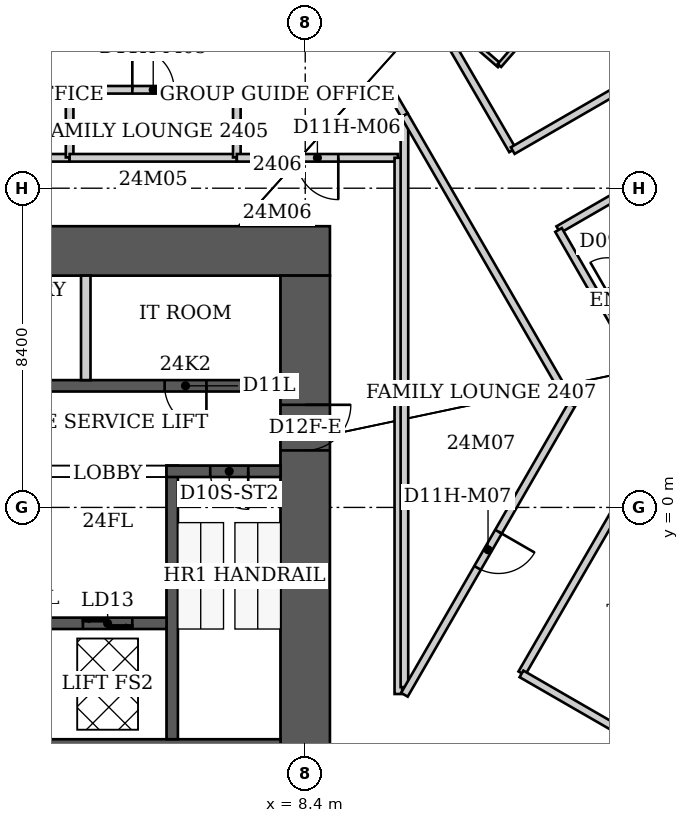
"""IFC4 building model, lengths in metres.
Left out: names, types, materials, properties, quantities, classifications, styles, units other than length and angle.
Written with IfcOpenShell. Run it as: python <this file> out.ifc"""

import sys

from ifc_helpers import new_model, si_unit, direction, frame, frame_2d, origin, place, context, subcontext, project, spatial, rectangle, extrude, element, fill, save


model = new_model("IFC4")
c1 = context("Model", 3, precision=1e-05, world=origin(), true_north=direction((0.0, 1.0)))
c2 = subcontext(c1, "Body", "Model", "MODEL_VIEW")
j1 = project(units=[si_unit("LENGTHUNIT", "METRE"), si_unit("PLANEANGLEUNIT", "RADIAN")], contexts=[c1])
p1 = place(None, origin())
s1 = spatial("IfcSite", under=j1, at=p1, CompositionType="ELEMENT")
p2 = place(p1, origin())
s2 = spatial("IfcBuilding", under=s1, at=p2, CompositionType="ELEMENT")
p3 = place(p2, frame((0.0, 0.0, 100.6)))
s3 = spatial("IfcBuildingStorey", under=s2, at=p3, CompositionType="ELEMENT", Elevation=100.6)
p4 = place(p3, frame((-9.05, 6.75, 0.0), z_axis=(0.0, 0.0, 1.0), x_axis=(1.0, 0.0, 0.0)))
e1 = element("IfcWall", 1, at=p4, inside=s3, PredefinedType="SHEAR", context=c2, shape_type="SweptSolid", body=[
    extrude(rectangle(XDim=18.1, YDim=1.3, at=frame_2d((9.05, 0.0))), origin(), (0.0, 0.0, 1.0), 3.8),
])
p5 = place(p3, frame((8.4, -9.2, 0.0), z_axis=(0.0, 0.0, 1.0), x_axis=(0.0, 1.0, 0.0)))
e2 = element("IfcWall", 2, at=p5, inside=s3, PredefinedType="SHEAR", context=c2, shape_type="SweptSolid", body=[
    extrude(rectangle(XDim=15.3, YDim=1.3, at=frame_2d((7.65, 0.0))), origin(), (0.0, 0.0, 1.0), 3.8),
])
p6 = place(p5, frame((10.7, 0.0, 0.0)))
e3 = element("IfcOpeningElement", 3, at=p6, cuts=e2, PredefinedType="OPENING", context=c2, shape_type="SweptSolid", body=[
    extrude(rectangle(XDim=1.2, YDim=2.2, at=frame_2d((0.6, 1.1))), frame((0.0, 0.65, 0.0), z_axis=(0.0, -1.0, 0.0), x_axis=(1.0, 0.0, 0.0)), (0.0, 0.0, 1.0), 1.3),
])
p7 = place(p3, frame((-7.75, -6.5, 0.0), z_axis=(0.0, 0.0, 1.0), x_axis=(1.0, 0.0, 0.0)))
e4 = element("IfcWall", 4, at=p7, inside=s3, PredefinedType="SHEAR", context=c2, shape_type="SweptSolid", body=[
    extrude(rectangle(XDim=15.5, YDim=0.8, at=frame_2d((7.75, 0.0))), origin(), (0.0, 0.0, 1.0), 3.8),
])
p8 = place(p3, frame((4.9, -6.1, 0.0), z_axis=(0.0, 0.0, 1.0), x_axis=(0.0, 1.0, 0.0)))
e5 = element("IfcWall", 5, at=p8, inside=s3, PredefinedType="SHEAR", context=c2, shape_type="SweptSolid", body=[
    extrude(rectangle(XDim=7.2, YDim=0.3, at=frame_2d((3.6, 0.0))), origin(), (0.0, 0.0, 1.0), 3.8),
])
p9 = place(p3, frame((4.75, 0.95, 0.0), z_axis=(0.0, 0.0, 1.0), x_axis=(1.0, 0.0, 0.0)))
e6 = element("IfcWall", 6, at=p9, inside=s3, PredefinedType="SHEAR", context=c2, shape_type="SweptSolid", body=[
    extrude(rectangle(XDim=3.0, YDim=0.3, at=frame_2d((1.5, 0.0))), origin(), (0.0, 0.0, 1.0), 3.8),
])
p10 = place(p9, frame((1.15, 0.0, 0.0)))
e7 = element("IfcOpeningElement", 7, at=p10, cuts=e6, PredefinedType="OPENING", context=c2, shape_type="SweptSolid", body=[
    extrude(rectangle(XDim=1.0, YDim=2.2, at=frame_2d((0.5, 1.1))), frame((0.0, 0.15, 0.0), z_axis=(0.0, -1.0, 0.0), x_axis=(1.0, 0.0, 0.0)), (0.0, 0.0, 1.0), 0.3),
])
p11 = place(p3, frame((1.65, -3.05, 0.0), z_axis=(0.0, 0.0, 1.0), x_axis=(1.0, 0.0, 0.0)))
e8 = element("IfcWall", 8, at=p11, inside=s3, PredefinedType="SHEAR", context=c2, shape_type="SweptSolid", body=[
    extrude(rectangle(XDim=3.1, YDim=0.3, at=frame_2d((1.55, 0.0))), origin(), (0.0, 0.0, 1.0), 3.8),
])
p12 = place(p11, frame((0.9, 0.0, 0.0)))
e9 = element("IfcOpeningElement", 9, at=p12, cuts=e8, PredefinedType="OPENING", context=c2, shape_type="SweptSolid", body=[
    extrude(rectangle(XDim=1.3, YDim=2.1, at=frame_2d((0.65, 1.05))), frame((0.0, 0.15, 0.0), z_axis=(0.0, -1.0, 0.0), x_axis=(1.0, 0.0, 0.0)), (0.0, 0.0, 1.0), 0.3),
])
p13 = place(p3, frame((-7.75, 3.2, 0.0), z_axis=(0.0, 0.0, 1.0), x_axis=(1.0, 0.0, 0.0)))
e10 = element("IfcWall", 10, at=p13, inside=s3, PredefinedType="SHEAR", context=c2, shape_type="SweptSolid", body=[
    extrude(rectangle(XDim=15.5, YDim=0.3, at=frame_2d((7.75, 0.0))), origin(), (0.0, 0.0, 1.0), 3.8),
])
p14 = place(p13, frame((7.2, 0.0, 0.0)))
e11 = element("IfcOpeningElement", 11, at=p14, cuts=e10, PredefinedType="OPENING", context=c2, shape_type="SweptSolid", body=[
    extrude(rectangle(XDim=1.1, YDim=2.2, at=frame_2d((0.55, 1.1))), frame((0.0, 0.15, 0.0), z_axis=(0.0, -1.0, 0.0), x_axis=(1.0, 0.0, 0.0)), (0.0, 0.0, 1.0), 0.3),
])
p15 = place(p13, frame((12.45, 0.0, 0.0)))
e12 = element("IfcOpeningElement", 12, at=p15, cuts=e10, PredefinedType="OPENING", context=c2, shape_type="SweptSolid", body=[
    extrude(rectangle(XDim=1.1, YDim=2.2, at=frame_2d((0.55, 1.1))), frame((0.0, 0.15, 0.0), z_axis=(0.0, -1.0, 0.0), x_axis=(1.0, 0.0, 0.0)), (0.0, 0.0, 1.0), 0.3),
])
p16 = place(p3, frame((2.625, 3.35, 0.0), z_axis=(0.0, 0.0, 1.0), x_axis=(0.0, 1.0, 0.0)))
e13 = element("IfcWall", 13, at=p16, inside=s3, PredefinedType="PARTITIONING", context=c2, shape_type="SweptSolid", body=[
    extrude(rectangle(XDim=2.75, YDim=0.25, at=frame_2d((1.375, 0.0))), origin(), (0.0, 0.0, 1.0), 3.8),
])
p17 = place(p3, frame((-2.2, 10.99, 0.0), z_axis=(0.0, 0.0, 1.0), x_axis=(1.0, 0.0, 0.0)))
e14 = element("IfcWall", 14, at=p17, inside=s3, PredefinedType="PARTITIONING", context=c2, shape_type="SweptSolid", body=[
    extrude(rectangle(XDim=4.4, YDim=0.2, at=frame_2d((2.2, 0.0))), origin(), (0.0, 0.0, 1.0), 3.64),
])
p18 = place(p17, frame((1.65, 0.0, 0.0)))
e15 = element("IfcOpeningElement", 15, at=p18, cuts=e14, PredefinedType="OPENING", context=c2, shape_type="SweptSolid", body=[
    extrude(rectangle(XDim=1.1, YDim=2.2, at=frame_2d((0.55, 1.1))), frame((0.0, 0.1, 0.0), z_axis=(0.0, -1.0, 0.0), x_axis=(1.0, 0.0, 0.0)), (0.0, 0.0, 1.0), 0.2),
])
p19 = place(p3, frame((2.2, 9.2, 0.0), z_axis=(0.0, 0.0, 1.0), x_axis=(-1.0, 0.0, 0.0)))
e16 = element("IfcWall", 16, at=p19, inside=s3, PredefinedType="PARTITIONING", context=c2, shape_type="SweptSolid", body=[
    extrude(rectangle(XDim=4.4, YDim=0.2, at=frame_2d((2.2, 0.0))), origin(), (0.0, 0.0, 1.0), 3.64),
])
p20 = place(p3, frame((2.2, 10.98, 0.0), z_axis=(0.0, 0.0, 1.0), x_axis=(0.0, -1.0, 0.0)))
e17 = element("IfcWall", 17, at=p20, inside=s3, PredefinedType="PARTITIONING", context=c2, shape_type="SweptSolid", body=[
    extrude(rectangle(XDim=1.77, YDim=0.2, at=frame_2d((0.885, 0.0))), origin(), (0.0, 0.0, 1.0), 3.64),
])
p21 = place(p3, frame((2.2, 10.99, 0.0), z_axis=(0.0, 0.0, 1.0), x_axis=(1.0, 0.0, 0.0)))
e18 = element("IfcWall", 18, at=p21, inside=s3, PredefinedType="PARTITIONING", context=c2, shape_type="SweptSolid", body=[
    extrude(rectangle(XDim=4.4, YDim=0.2, at=frame_2d((2.2, 0.0))), origin(), (0.0, 0.0, 1.0), 3.64),
])
p22 = place(p21, frame((1.65, 0.0, 0.0)))
e19 = element("IfcOpeningElement", 19, at=p22, cuts=e18, PredefinedType="OPENING", context=c2, shape_type="SweptSolid", body=[
    extrude(rectangle(XDim=1.1, YDim=2.2, at=frame_2d((0.55, 1.1))), frame((0.0, 0.1, 0.0), z_axis=(0.0, -1.0, 0.0), x_axis=(1.0, 0.0, 0.0)), (0.0, 0.0, 1.0), 0.2),
])
p23 = place(p3, frame((6.6, 9.2, 0.0), z_axis=(0.0, 0.0, 1.0), x_axis=(-1.0, 0.0, 0.0)))
e20 = element("IfcWall", 20, at=p23, inside=s3, PredefinedType="PARTITIONING", context=c2, shape_type="SweptSolid", body=[
    extrude(rectangle(XDim=4.4, YDim=0.2, at=frame_2d((2.2, 0.0))), origin(), (0.0, 0.0, 1.0), 3.64),
])
p24 = place(p3, frame((6.6, 10.98, 0.0), z_axis=(0.0, 0.0, 1.0), x_axis=(0.0, -1.0, 0.0)))
e21 = element("IfcWall", 21, at=p24, inside=s3, PredefinedType="PARTITIONING", context=c2, shape_type="SweptSolid", body=[
    extrude(rectangle(XDim=1.77, YDim=0.2, at=frame_2d((0.885, 0.0))), origin(), (0.0, 0.0, 1.0), 3.64),
])
p25 = place(p3, frame((6.6, 10.99, 0.0), z_axis=(0.0, 0.0, 1.0), x_axis=(1.0, 0.0, 0.0)))
e22 = element("IfcWall", 22, at=p25, inside=s3, PredefinedType="PARTITIONING", context=c2, shape_type="SweptSolid", body=[
    extrude(rectangle(XDim=4.02, YDim=0.2, at=frame_2d((2.01, 0.0))), origin(), (0.0, 0.0, 1.0), 3.64),
])
p26 = place(p3, frame((10.62, 10.99, 0.0), z_axis=(0.0, 0.0, 1.0), x_axis=(0.503009091795, -0.864281119527, 0.0)))
e23 = element("IfcWall", 23, at=p26, inside=s3, PredefinedType="PARTITIONING", context=c2, shape_type="SweptSolid", body=[
    extrude(rectangle(XDim=0.775, YDim=0.2, at=frame_2d((0.388, 0.0))), origin(), (0.0, 0.0, 1.0), 3.64),
])
p27 = place(p3, frame((10.84, 9.2, 0.0), z_axis=(0.0, 0.0, 1.0), x_axis=(-1.0, 0.0, 0.0)))
e24 = element("IfcWall", 24, at=p27, inside=s3, PredefinedType="PARTITIONING", context=c2, shape_type="SweptSolid", body=[
    extrude(rectangle(XDim=4.24, YDim=0.2, at=frame_2d((2.12, 0.0))), origin(), (0.0, 0.0, 1.0), 3.64),
])
p28 = place(p27, frame((1.57, 0.0, 0.0)))
e25 = element("IfcOpeningElement", 25, at=p28, cuts=e24, PredefinedType="OPENING", context=c2, shape_type="SweptSolid", body=[
    extrude(rectangle(XDim=1.1, YDim=2.2, at=frame_2d((0.55, 1.1))), frame((0.0, 0.1, 0.0), z_axis=(0.0, -1.0, 0.0), x_axis=(1.0, 0.0, 0.0)), (0.0, 0.0, 1.0), 0.2),
])
p29 = place(p3, frame((10.85, -4.91, 0.0), z_axis=(0.0, 0.0, 1.0), x_axis=(0.0, 1.0, 0.0)))
e26 = element("IfcWall", 26, at=p29, inside=s3, PredefinedType="PARTITIONING", context=c2, shape_type="SweptSolid", body=[
    extrude(rectangle(XDim=14.11, YDim=0.2, at=frame_2d((7.055, 0.0))), origin(), (0.0, 0.0, 1.0), 3.64),
])
p30 = place(p3, frame((11.01, 10.125, 0.0), z_axis=(0.0, 0.0, 1.0), x_axis=(0.0, -1.0, 0.0)))
e27 = element("IfcWall", 27, at=p30, inside=s3, PredefinedType="PARTITIONING", context=c2, shape_type="SweptSolid", body=[
    extrude(rectangle(XDim=14.855, YDim=0.2, at=frame_2d((7.427, 0.0))), origin(), (0.0, 0.0, 1.0), 3.64),
])
p31 = place(p3, frame((11.01, 10.32, 0.0), z_axis=(0.0, 0.0, 1.0), x_axis=(0.500036278648, -0.866004457284, 0.0)))
e28 = element("IfcWall", 28, at=p31, inside=s3, PredefinedType="PARTITIONING", context=c2, shape_type="SweptSolid", body=[
    extrude(rectangle(XDim=8.799, YDim=0.2, at=frame_2d((4.399, 0.0))), origin(), (0.0, 0.0, 1.0), 3.64),
])
p32 = place(p3, frame((11.55, 13.33, 0.0), z_axis=(0.0, 0.0, 1.0), x_axis=(0.755437535555, -0.655220672655, 0.0)))
e29 = element("IfcWall", 29, at=p32, inside=s3, PredefinedType="PARTITIONING", context=c2, shape_type="SweptSolid", body=[
    extrude(rectangle(XDim=2.594, YDim=0.12, at=frame_2d((1.297, 0.0))), origin(), (0.0, 0.0, 1.0), 3.64),
])
p33 = place(p3, frame((13.51, 11.63, 0.0), z_axis=(0.0, 0.0, 1.0), x_axis=(0.655566599468, 0.75513736079, 0.0)))
e30 = element("IfcWall", 30, at=p33, inside=s3, PredefinedType="PARTITIONING", context=c2, shape_type="SweptSolid", body=[
    extrude(rectangle(XDim=2.41, YDim=0.12, at=frame_2d((1.205, 0.0))), origin(), (0.0, 0.0, 1.0), 3.64),
])
p34 = place(p3, frame((13.855, 9.399, 0.0), z_axis=(0.0, 0.0, 1.0), x_axis=(-0.502087259191, 0.864816965698, 0.0)))
e31 = element("IfcWall", 31, at=p34, inside=s3, PredefinedType="PARTITIONING", context=c2, shape_type="SweptSolid", body=[
    extrude(rectangle(XDim=4.028, YDim=0.2, at=frame_2d((2.014, 0.0))), origin(), (0.0, 0.0, 1.0), 3.64),
])
p35 = place(p3, frame((14.097, -4.367, 0.0), z_axis=(0.0, 0.0, 1.0), x_axis=(0.500859137679, 0.865528811885, 0.0)))
e32 = element("IfcWall", 32, at=p35, inside=s3, PredefinedType="PARTITIONING", context=c2, shape_type="SweptSolid", body=[
    extrude(rectangle(XDim=7.552, YDim=0.2, at=frame_2d((3.776, 0.0))), origin(), (0.0, 0.0, 1.0), 3.64),
])
p36 = place(p3, frame((15.06, 7.31, 0.0), z_axis=(0.0, 0.0, 1.0), x_axis=(0.866042039906, 0.499971184285, 0.0)))
e33 = element("IfcWall", 33, at=p36, inside=s3, PredefinedType="PARTITIONING", context=c2, shape_type="SweptSolid", body=[
    extrude(rectangle(XDim=11.47, YDim=0.2, at=frame_2d((5.735, 0.0))), origin(), (0.0, 0.0, 1.0), 3.64),
])
p37 = place(p36, frame((5.235, 0.0, 0.0)))
e34 = element("IfcOpeningElement", 34, at=p37, cuts=e33, PredefinedType="OPENING", context=c2, shape_type="SweptSolid", body=[
    extrude(rectangle(XDim=1.0, YDim=2.13, at=frame_2d((0.5, 1.065))), frame((0.0, 0.1, 0.0), z_axis=(0.0, -1.0, 0.0), x_axis=(1.0, 0.0, 0.0)), (0.0, 0.0, 1.0), 0.2),
])
p38 = place(p3, frame((15.065, 7.301, 0.0), z_axis=(0.0, 0.0, 1.0), x_axis=(0.498810334238, -0.866711168993, 0.0)))
e35 = element("IfcWall", 35, at=p38, inside=s3, PredefinedType="PARTITIONING", context=c2, shape_type="SweptSolid", body=[
    extrude(rectangle(XDim=2.055, YDim=0.2, at=frame_2d((1.028, 0.0))), origin(), (0.0, 0.0, 1.0), 3.64),
])
p39 = place(p3, frame((15.41, 2.7, 0.0), z_axis=(0.0, 0.0, 1.0), x_axis=(-0.499556067326, -0.866281556769, 0.0)))
e36 = element("IfcWall", 36, at=p39, inside=s3, PredefinedType="PARTITIONING", context=c2, shape_type="SweptSolid", body=[
    extrude(rectangle(XDim=8.808, YDim=0.2, at=frame_2d((4.404, 0.0))), origin(), (0.0, 0.0, 1.0), 3.64),
])
p40 = place(p39, frame((3.854, 0.0, 0.0)))
e37 = element("IfcOpeningElement", 37, at=p40, cuts=e36, PredefinedType="OPENING", context=c2, shape_type="SweptSolid", body=[
    extrude(rectangle(XDim=1.1, YDim=2.2, at=frame_2d((0.55, 1.1))), frame((0.0, 0.1, 0.0), z_axis=(0.0, -1.0, 0.0), x_axis=(1.0, 0.0, 0.0)), (0.0, 0.0, 1.0), 0.2),
])
p41 = place(p3, frame((16.09, 5.52, 0.0), z_axis=(0.0, 0.0, 1.0), x_axis=(0.500424596343, -0.865780124151, 0.0)))
e38 = element("IfcWall", 38, at=p41, inside=s3, PredefinedType="PARTITIONING", context=c2, shape_type="SweptSolid", body=[
    extrude(rectangle(XDim=2.518, YDim=0.12, at=frame_2d((1.259, 0.0))), origin(), (0.0, 0.0, 1.0), 3.64),
])
p42 = place(p3, frame((18.47, 6.89, 0.0), z_axis=(0.0, 0.0, 1.0), x_axis=(-0.866679536557, -0.498865293355, 0.0)))
e39 = element("IfcWall", 39, at=p42, inside=s3, PredefinedType="PARTITIONING", context=c2, shape_type="SweptSolid", body=[
    extrude(rectangle(XDim=2.746, YDim=0.12, at=frame_2d((1.373, 0.0))), origin(), (0.0, 0.0, 1.0), 3.64),
])
p43 = place(p42, frame((1.546, 0.0, 0.0)))
e40 = element("IfcOpeningElement", 40, at=p43, cuts=e39, PredefinedType="OPENING", context=c2, shape_type="SweptSolid", body=[
    extrude(rectangle(XDim=0.9, YDim=2.03, at=frame_2d((0.45, 1.015))), frame((0.0, 0.06, 0.0), z_axis=(0.0, -1.0, 0.0), x_axis=(1.0, 0.0, 0.0)), (0.0, 0.0, 1.0), 0.12),
])
p44 = place(p3, frame((21.084, -8.415, 0.0), z_axis=(0.0, 0.0, 1.0), x_axis=(-0.866174008169, 0.499742521277, 0.0)))
e41 = element("IfcWall", 41, at=p44, inside=s3, PredefinedType="PARTITIONING", context=c2, shape_type="SweptSolid", body=[
    extrude(rectangle(XDim=8.074, YDim=0.2, at=frame_2d((4.037, 0.0))), origin(), (0.0, 0.0, 1.0), 3.64),
])
p45 = place(p44, frame((3.537, 0.0, 0.0)))
e42 = element("IfcOpeningElement", 42, at=p45, cuts=e41, PredefinedType="OPENING", context=c2, shape_type="SweptSolid", body=[
    extrude(rectangle(XDim=1.0, YDim=2.13, at=frame_2d((0.5, 1.065))), frame((0.0, 0.1, 0.0), z_axis=(0.0, -1.0, 0.0), x_axis=(1.0, 0.0, 0.0)), (0.0, 0.0, 1.0), 0.2),
])
p46 = place(p3, frame((23.794, 15.125, 0.0), z_axis=(0.0, 0.0, 1.0), x_axis=(-0.866032823784, -0.499987147964, 0.0)))
e43 = element("IfcWall", 43, at=p46, inside=s3, PredefinedType="PARTITIONING", context=c2, shape_type="SweptSolid", body=[
    extrude(rectangle(XDim=11.47, YDim=0.2, at=frame_2d((5.735, 0.0))), origin(), (0.0, 0.0, 1.0), 3.64),
])
p47 = place(p46, frame((5.235, 0.0, 0.0)))
e44 = element("IfcOpeningElement", 44, at=p47, cuts=e43, PredefinedType="OPENING", context=c2, shape_type="SweptSolid", body=[
    extrude(rectangle(XDim=1.0, YDim=2.13, at=frame_2d((0.5, 1.065))), frame((0.0, 0.1, 0.0), z_axis=(0.0, -1.0, 0.0), x_axis=(1.0, 0.0, 0.0)), (0.0, 0.0, 1.0), 0.2),
])
p48 = place(p43, origin())
e45 = element("IfcDoor", 45, at=p48, inside=s3, OperationType="SINGLE_SWING_RIGHT", PredefinedType="DOOR", context=c2, shape_type="SweptSolid", body=[
    extrude(rectangle(XDim=0.9, YDim=2.03, at=frame_2d((0.45, 1.015))), frame((0.0, 0.025, 0.0), z_axis=(0.0, -1.0, 0.0), x_axis=(1.0, 0.0, 0.0)), (0.0, 0.0, 1.0), 0.05),
])
fill(e40, e45)
p49 = place(p22, origin())
e46 = element("IfcDoor", 46, at=p49, inside=s3, OperationType="SINGLE_SWING_LEFT", PredefinedType="DOOR", context=c2, shape_type="SweptSolid", body=[
    extrude(rectangle(XDim=1.1, YDim=2.2, at=frame_2d((0.55, 1.1))), frame((0.0, 0.025, 0.0), z_axis=(0.0, -1.0, 0.0), x_axis=(1.0, 0.0, 0.0)), (0.0, 0.0, 1.0), 0.05),
])
fill(e19, e46)
p50 = place(p28, origin())
e47 = element("IfcDoor", 47, at=p50, inside=s3, OperationType="SINGLE_SWING_LEFT", PredefinedType="DOOR", context=c2, shape_type="SweptSolid", body=[
    extrude(rectangle(XDim=1.1, YDim=2.2, at=frame_2d((0.55, 1.1))), frame((0.0, 0.025, 0.0), z_axis=(0.0, -1.0, 0.0), x_axis=(1.0, 0.0, 0.0)), (0.0, 0.0, 1.0), 0.05),
])
fill(e25, e47)
p51 = place(p40, origin())
e48 = element("IfcDoor", 48, at=p51, inside=s3, OperationType="SINGLE_SWING_LEFT", PredefinedType="DOOR", context=c2, shape_type="SweptSolid", body=[
    extrude(rectangle(XDim=1.1, YDim=2.2, at=frame_2d((0.55, 1.1))), frame((0.0, 0.025, 0.0), z_axis=(0.0, -1.0, 0.0), x_axis=(1.0, 0.0, 0.0)), (0.0, 0.0, 1.0), 0.05),
])
fill(e37, e48)
p52 = place(p10, origin())
e49 = element("IfcDoor", 49, at=p52, inside=s3, OperationType="SINGLE_SWING_RIGHT", PredefinedType="DOOR", context=c2, shape_type="SweptSolid", body=[
    extrude(rectangle(XDim=1.0, YDim=2.2, at=frame_2d((0.5, 1.1))), frame((0.0, 0.025, 0.0), z_axis=(0.0, -1.0, 0.0), x_axis=(1.0, 0.0, 0.0)), (0.0, 0.0, 1.0), 0.05),
])
fill(e7, e49)
p53 = place(p6, origin())
e50 = element("IfcDoor", 50, at=p53, inside=s3, OperationType="SINGLE_SWING_RIGHT", PredefinedType="DOOR", context=c2, shape_type="SweptSolid", body=[
    extrude(rectangle(XDim=1.2, YDim=2.2, at=frame_2d((0.6, 1.1))), frame((0.0, 0.025, 0.0), z_axis=(0.0, -1.0, 0.0), x_axis=(1.0, 0.0, 0.0)), (0.0, 0.0, 1.0), 0.05),
])
fill(e3, e50)
p54 = place(p15, origin())
e51 = element("IfcDoor", 51, at=p54, inside=s3, OperationType="SINGLE_SWING_RIGHT", PredefinedType="DOOR", context=c2, shape_type="SweptSolid", body=[
    extrude(rectangle(XDim=1.1, YDim=2.2, at=frame_2d((0.55, 1.1))), frame((0.0, 0.025, 0.0), z_axis=(0.0, -1.0, 0.0), x_axis=(1.0, 0.0, 0.0)), (0.0, 0.0, 1.0), 0.05),
])
fill(e12, e51)
p55 = place(p12, origin())
e52 = element("IfcDoor", 52, at=p55, inside=s3, OperationType="DOUBLE_DOOR_SLIDING", PredefinedType="DOOR", context=c2, shape_type="SweptSolid", body=[
    extrude(rectangle(XDim=1.3, YDim=2.1, at=frame_2d((0.65, 1.05))), frame((0.0, 0.025, 0.0), z_axis=(0.0, -1.0, 0.0), x_axis=(1.0, 0.0, 0.0)), (0.0, 0.0, 1.0), 0.05),
])
fill(e9, e52)
save(model, sys.argv[1])
